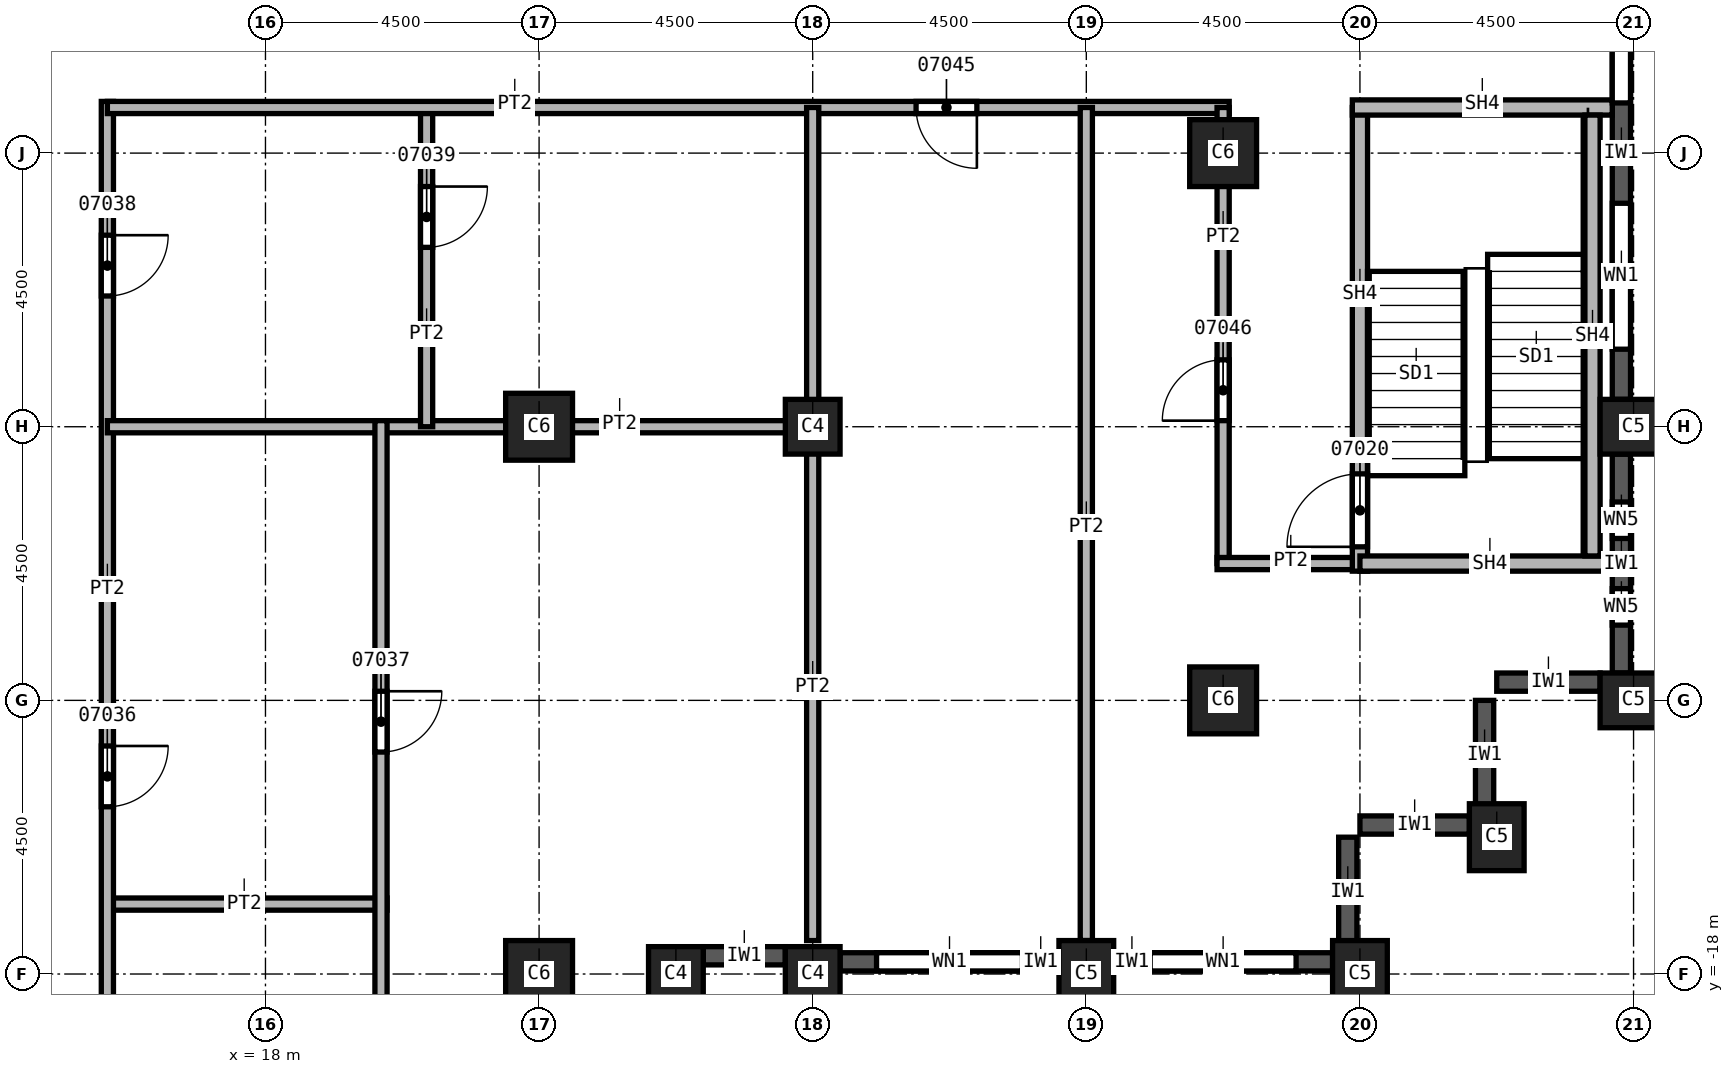
"""IFC4 building model, lengths in metres.
Left out: names, types, materials, properties, quantities, classifications, styles, units other than length and angle.
Written with IfcOpenShell. Run it as: python <this file> out.ifc"""

import sys

from ifc_helpers import new_model, si_unit, direction, frame, frame_2d, origin, origin_2d, place, context, subcontext, project, spatial, rectangle, extrude, element, fill, save


model = new_model("IFC4")
c1 = context("Model", 3, precision=1e-05, world=origin(), true_north=direction((0.0, 1.0)))
c2 = subcontext(c1, "Body", "Model", "MODEL_VIEW")
j1 = project(units=[si_unit("LENGTHUNIT", "METRE"), si_unit("PLANEANGLEUNIT", "RADIAN")], contexts=[c1])
p1 = place(None, origin())
s1 = spatial("IfcSite", under=j1, at=p1, CompositionType="ELEMENT")
p2 = place(p1, origin())
s2 = spatial("IfcBuilding", under=s1, at=p2, CompositionType="ELEMENT")
p3 = place(p2, frame((0.0, 0.0, 138.0)))
s3 = spatial("IfcBuildingStorey", under=s2, at=p3, CompositionType="ELEMENT", Elevation=138.0)
for number, where, z_axis, x_axis in (
    (1, (40.5, -9.0, 0.0), (0.0, 0.0, 1.0), (0.0, 1.0, 0.0)),
    (2, (40.5, -13.5, 0.0), (0.0, 0.0, 1.0), (0.0, 1.0, 0.0)),
    (3, (38.25, -15.75, 0.0), (0.0, 0.0, 1.0), (1.0, 0.0, 0.0)),
    (4, (31.5, -18.0, 0.0), (0.0, 0.0, 1.0), (1.0, 0.0, 0.0)),
    (5, (36.0, -18.0, 0.0), (0.0, 0.0, 1.0), (1.0, 0.0, 0.0)),
):
    element("IfcColumn", number, at=place(p3, frame(where, z_axis=z_axis, x_axis=x_axis)), inside=s3, PredefinedType="COLUMN", context=c2, shape_type="SweptSolid", body=[
        extrude(rectangle(XDim=0.9, YDim=1.1, at=origin_2d()), origin(), (0.0, 0.0, 1.0), 3.7),
    ])
for number, where, z_axis, x_axis in (
    (6, (33.75, -4.5, 0.0), (0.0, 0.0, 1.0), (1.0, 0.0, 0.0)),
    (7, (33.75, -13.5, 0.0), (0.0, 0.0, 1.0), (1.0, 0.0, 0.0)),
    (8, (22.5, -9.0, 0.0), (0.0, 0.0, 1.0), (1.0, 0.0, 0.0)),
    (9, (22.5, -18.0, 0.0), (0.0, 0.0, 1.0), (1.0, 0.0, 0.0)),
):
    element("IfcColumn", number, at=place(p3, frame(where, z_axis=z_axis, x_axis=x_axis)), inside=s3, PredefinedType="COLUMN", context=c2, shape_type="SweptSolid", body=[
        extrude(rectangle(XDim=1.1, YDim=1.1, at=origin_2d()), origin(), (0.0, 0.0, 1.0), 3.7),
    ])
for number, where, z_axis, x_axis in (
    (10, (27.0, -9.0, 0.0), (0.0, 0.0, 1.0), (1.0, 0.0, 0.0)),
    (11, (27.0, -18.0, 0.0), (0.0, 0.0, 1.0), (1.0, 0.0, 0.0)),
    (12, (24.75, -18.0, 0.0), (0.0, 0.0, 1.0), (1.0, 0.0, 0.0)),
):
    element("IfcColumn", number, at=place(p3, frame(where, z_axis=z_axis, x_axis=x_axis)), inside=s3, PredefinedType="COLUMN", context=c2, shape_type="SweptSolid", body=[
        extrude(rectangle(XDim=0.9, YDim=0.9, at=origin_2d()), origin(), (0.0, 0.0, 1.0), 3.7),
    ])
for number, where, z_axis, x_axis in (
    (13, (35.8, -17.55, 0.0), (0.0, 0.0, 1.0), (0.0, 1.0, 0.0)),
    (14, (37.8, -15.55, 0.0), (0.0, 0.0, 1.0), (-1.0, 0.0, 0.0)),
    (15, (38.05, -15.3, 0.0), (0.0, 0.0, 1.0), (0.0, 1.0, 0.0)),
):
    element("IfcWall", number, at=place(p3, frame(where, z_axis=z_axis, x_axis=x_axis)), inside=s3, PredefinedType="SOLIDWALL", context=c2, shape_type="SweptSolid", body=[
        extrude(rectangle(XDim=1.8, YDim=0.3, at=frame_2d((0.9, 0.0))), origin(), (0.0, 0.0, 1.0), 3.1),
    ])
p4 = place(p3, frame((39.95, -13.2, 0.0), z_axis=(0.0, 0.0, 1.0), x_axis=(-1.0, 0.0, 0.0)))
e16 = element("IfcWall", 16, at=p4, inside=s3, PredefinedType="SOLIDWALL", context=c2, shape_type="SweptSolid", body=[
    extrude(rectangle(XDim=1.7, YDim=0.3, at=frame_2d((0.85, 0.0))), origin(), (0.0, 0.0, 1.0), 3.1),
])
p5 = place(p3, frame((25.2, -17.7, 0.0), z_axis=(0.0, 0.0, 1.0), x_axis=(1.0, 0.0, 0.0)))
e17 = element("IfcWall", 17, at=p5, inside=s3, PredefinedType="SOLIDWALL", context=c2, shape_type="SweptSolid", body=[
    extrude(rectangle(XDim=1.35, YDim=0.3, at=frame_2d((0.675, 0.0))), origin(), (0.0, 0.0, 1.0), 3.1),
])
p6 = place(p3, frame((27.45, -17.8, 0.0), z_axis=(0.0, 0.0, 1.0), x_axis=(1.0, 0.0, 0.0)))
e18 = element("IfcWall", 18, at=p6, inside=s3, PredefinedType="SOLIDWALL", context=c2, shape_type="SweptSolid", body=[
    extrude(rectangle(XDim=3.6, YDim=0.3, at=frame_2d((1.8, 0.0))), origin(), (0.0, 0.0, 1.0), 3.1),
])
p7 = place(p6, frame((0.6, 0.0, 0.8)))
e19 = element("IfcOpeningElement", 19, at=p7, cuts=e18, PredefinedType="OPENING", context=c2, shape_type="SweptSolid", body=[
    extrude(rectangle(XDim=2.4, YDim=1.95, at=frame_2d((1.2, 0.975))), frame((0.0, 0.15, 0.0), z_axis=(0.0, -1.0, 0.0), x_axis=(1.0, 0.0, 0.0)), (0.0, 0.0, 1.0), 0.3),
])
p8 = place(p3, frame((31.95, -17.8, 0.0), z_axis=(0.0, 0.0, 1.0), x_axis=(1.0, 0.0, 0.0)))
e20 = element("IfcWall", 20, at=p8, inside=s3, PredefinedType="SOLIDWALL", context=c2, shape_type="SweptSolid", body=[
    extrude(rectangle(XDim=3.6, YDim=0.3, at=frame_2d((1.8, 0.0))), origin(), (0.0, 0.0, 1.0), 3.1),
])
p9 = place(p8, frame((0.6, 0.0, 0.8)))
e21 = element("IfcOpeningElement", 21, at=p9, cuts=e20, PredefinedType="OPENING", context=c2, shape_type="SweptSolid", body=[
    extrude(rectangle(XDim=2.4, YDim=1.95, at=frame_2d((1.2, 0.975))), frame((0.0, 0.15, 0.0), z_axis=(0.0, -1.0, 0.0), x_axis=(1.0, 0.0, 0.0)), (0.0, 0.0, 1.0), 0.3),
])
p10 = place(p3, frame((40.3, -13.05, 0.0), z_axis=(0.0, 0.0, 1.0), x_axis=(0.0, 1.0, 0.0)))
e22 = element("IfcWall", 22, at=p10, inside=s3, PredefinedType="SOLIDWALL", context=c2, shape_type="SweptSolid", body=[
    extrude(rectangle(XDim=3.6, YDim=0.3, at=frame_2d((1.8, 0.0))), origin(), (0.0, 0.0, 1.0), 3.1),
])
p11 = place(p10, frame((0.788, 0.0, 0.8)))
e23 = element("IfcOpeningElement", 23, at=p11, cuts=e22, PredefinedType="OPENING", context=c2, shape_type="SweptSolid", body=[
    extrude(rectangle(XDim=0.6, YDim=1.95, at=frame_2d((0.3, 0.975))), frame((0.0, 0.15, 0.0), z_axis=(0.0, -1.0, 0.0), x_axis=(1.0, 0.0, 0.0)), (0.0, 0.0, 1.0), 0.3),
])
p12 = place(p10, frame((2.212, 0.0, 0.8)))
e24 = element("IfcOpeningElement", 24, at=p12, cuts=e22, PredefinedType="OPENING", context=c2, shape_type="SweptSolid", body=[
    extrude(rectangle(XDim=0.6, YDim=1.95, at=frame_2d((0.3, 0.975))), frame((0.0, 0.15, 0.0), z_axis=(0.0, -1.0, 0.0), x_axis=(1.0, 0.0, 0.0)), (0.0, 0.0, 1.0), 0.3),
])
p13 = place(p3, frame((40.3, -8.55, 0.0), z_axis=(0.0, 0.0, 1.0), x_axis=(0.0, 1.0, 0.0)))
e25 = element("IfcWall", 25, at=p13, inside=s3, PredefinedType="SOLIDWALL", context=c2, shape_type="SweptSolid", body=[
    extrude(rectangle(XDim=8.1, YDim=0.3, at=frame_2d((4.05, 0.0))), origin(), (0.0, 0.0, 1.0), 3.1),
])
p14 = place(p13, frame((0.825, 0.0, 0.8)))
e26 = element("IfcOpeningElement", 26, at=p14, cuts=e25, PredefinedType="OPENING", context=c2, shape_type="SweptSolid", body=[
    extrude(rectangle(XDim=2.4, YDim=1.95, at=frame_2d((1.2, 0.975))), frame((0.0, 0.15, 0.0), z_axis=(0.0, -1.0, 0.0), x_axis=(1.0, 0.0, 0.0)), (0.0, 0.0, 1.0), 0.3),
])
p15 = place(p13, frame((4.875, 0.0, 0.8)))
e27 = element("IfcOpeningElement", 27, at=p15, cuts=e25, PredefinedType="OPENING", context=c2, shape_type="SweptSolid", body=[
    extrude(rectangle(XDim=2.4, YDim=1.95, at=frame_2d((1.2, 0.975))), frame((0.0, 0.15, 0.0), z_axis=(0.0, -1.0, 0.0), x_axis=(1.0, 0.0, 0.0)), (0.0, 0.0, 1.0), 0.3),
])
p16 = place(p3, frame((15.4, -16.85, 0.0), z_axis=(0.0, 0.0, 1.0), x_axis=(1.0, 0.0, 0.0)))
e28 = element("IfcWall", 28, at=p16, inside=s3, PredefinedType="PARTITIONING", context=c2, shape_type="SweptSolid", body=[
    extrude(rectangle(XDim=4.6, YDim=0.2, at=frame_2d((2.3, 0.0))), origin(), (0.0, 0.0, 1.0), 3.7),
])
p17 = place(p3, frame((15.4, -3.65, 0.0), z_axis=(0.0, 0.0, 1.0), x_axis=(0.0, -1.0, 0.0)))
e29 = element("IfcWall", 29, at=p17, inside=s3, PredefinedType="PARTITIONING", context=c2, shape_type="SweptSolid", body=[
    extrude(rectangle(XDim=19.6, YDim=0.2, at=frame_2d((9.8, 0.0))), origin(), (0.0, 0.0, 1.0), 3.7),
])
p18 = place(p17, frame((18.3, 0.0, 0.0)))
e30 = element("IfcOpeningElement", 30, at=p18, cuts=e29, PredefinedType="OPENING", context=c2, shape_type="SweptSolid", body=[
    extrude(rectangle(XDim=1.0, YDim=2.1, at=frame_2d((0.5, 1.05))), frame((0.0, 0.1, 0.0), z_axis=(0.0, -1.0, 0.0), x_axis=(1.0, 0.0, 0.0)), (0.0, 0.0, 1.0), 0.2),
])
p19 = place(p17, frame((10.6, 0.0, 0.0)))
e31 = element("IfcOpeningElement", 31, at=p19, cuts=e29, PredefinedType="OPENING", context=c2, shape_type="SweptSolid", body=[
    extrude(rectangle(XDim=1.0, YDim=2.1, at=frame_2d((0.5, 1.05))), frame((0.0, 0.1, 0.0), z_axis=(0.0, -1.0, 0.0), x_axis=(1.0, 0.0, 0.0)), (0.0, 0.0, 1.0), 0.2),
])
p20 = place(p17, frame((2.2, 0.0, 0.0)))
e32 = element("IfcOpeningElement", 32, at=p20, cuts=e29, PredefinedType="OPENING", context=c2, shape_type="SweptSolid", body=[
    extrude(rectangle(XDim=1.0, YDim=2.1, at=frame_2d((0.5, 1.05))), frame((0.0, 0.1, 0.0), z_axis=(0.0, -1.0, 0.0), x_axis=(1.0, 0.0, 0.0)), (0.0, 0.0, 1.0), 0.2),
])
p21 = place(p3, frame((15.4, -9.0, 0.0), z_axis=(0.0, 0.0, 1.0), x_axis=(1.0, 0.0, 0.0)))
e33 = element("IfcWall", 33, at=p21, inside=s3, PredefinedType="PARTITIONING", context=c2, shape_type="SweptSolid", body=[
    extrude(rectangle(XDim=11.7, YDim=0.2, at=frame_2d((5.85, 0.0))), origin(), (0.0, 0.0, 1.0), 3.7),
])
p22 = place(p3, frame((19.9, -8.9, 0.0), z_axis=(0.0, 0.0, 1.0), x_axis=(0.0, -1.0, 0.0)))
e34 = element("IfcWall", 34, at=p22, inside=s3, PredefinedType="PARTITIONING", context=c2, shape_type="SweptSolid", body=[
    extrude(rectangle(XDim=14.35, YDim=0.2, at=frame_2d((7.175, 0.0))), origin(), (0.0, 0.0, 1.0), 3.7),
])
p23 = place(p22, frame((4.45, 0.0, 0.0)))
e35 = element("IfcOpeningElement", 35, at=p23, cuts=e34, PredefinedType="OPENING", context=c2, shape_type="SweptSolid", body=[
    extrude(rectangle(XDim=1.0, YDim=2.1, at=frame_2d((0.5, 1.05))), frame((0.0, 0.1, 0.0), z_axis=(0.0, -1.0, 0.0), x_axis=(1.0, 0.0, 0.0)), (0.0, 0.0, 1.0), 0.2),
])
p24 = place(p3, frame((20.65, -3.75, 0.0), z_axis=(0.0, 0.0, 1.0), x_axis=(0.0, -1.0, 0.0)))
e36 = element("IfcWall", 36, at=p24, inside=s3, PredefinedType="PARTITIONING", context=c2, shape_type="SweptSolid", body=[
    extrude(rectangle(XDim=5.25, YDim=0.2, at=frame_2d((2.625, 0.0))), origin(), (0.0, 0.0, 1.0), 3.7),
])
p25 = place(p24, frame((1.3, 0.0, 0.0)))
e37 = element("IfcOpeningElement", 37, at=p25, cuts=e36, PredefinedType="OPENING", context=c2, shape_type="SweptSolid", body=[
    extrude(rectangle(XDim=1.0, YDim=2.1, at=frame_2d((0.5, 1.05))), frame((0.0, 0.1, 0.0), z_axis=(0.0, -1.0, 0.0), x_axis=(1.0, 0.0, 0.0)), (0.0, 0.0, 1.0), 0.2),
])
p26 = place(p3, frame((33.85, -3.75, 0.0), z_axis=(0.0, 0.0, 1.0), x_axis=(-1.0, 0.0, 0.0)))
e38 = element("IfcWall", 38, at=p26, inside=s3, PredefinedType="PARTITIONING", context=c2, shape_type="SweptSolid", body=[
    extrude(rectangle(XDim=18.45, YDim=0.2, at=frame_2d((9.225, 0.0))), origin(), (0.0, 0.0, 1.0), 3.7),
])
p27 = place(p26, frame((4.15, 0.0, 0.0)))
e39 = element("IfcOpeningElement", 39, at=p27, cuts=e38, PredefinedType="OPENING", context=c2, shape_type="SweptSolid", body=[
    extrude(rectangle(XDim=1.0, YDim=2.1, at=frame_2d((0.5, 1.05))), frame((0.0, 0.1, 0.0), z_axis=(0.0, -1.0, 0.0), x_axis=(1.0, 0.0, 0.0)), (0.0, 0.0, 1.0), 0.2),
])
for number, where, z_axis, x_axis in (
    (40, (27.0, -3.75, 0.0), (0.0, 0.0, 1.0), (0.0, -1.0, 0.0)),
    (41, (31.5, -3.75, 0.0), (0.0, 0.0, 1.0), (0.0, -1.0, 0.0)),
):
    element("IfcWall", number, at=place(p3, frame(where, z_axis=z_axis, x_axis=x_axis)), inside=s3, PredefinedType="PARTITIONING", context=c2, shape_type="SweptSolid", body=[
        extrude(rectangle(XDim=13.7, YDim=0.2, at=frame_2d((6.85, 0.0))), origin(), (0.0, 0.0, 1.0), 3.7),
    ])
p28 = place(p3, frame((33.75, -11.25, 0.0), z_axis=(0.0, 0.0, 1.0), x_axis=(0.0, 1.0, 0.0)))
e42 = element("IfcWall", 42, at=p28, inside=s3, PredefinedType="PARTITIONING", context=c2, shape_type="SweptSolid", body=[
    extrude(rectangle(XDim=7.5, YDim=0.2, at=frame_2d((3.75, 0.0))), origin(), (0.0, 0.0, 1.0), 3.7),
])
p29 = place(p28, frame((2.35, 0.0, 0.0)))
e43 = element("IfcOpeningElement", 43, at=p29, cuts=e42, PredefinedType="OPENING", context=c2, shape_type="SweptSolid", body=[
    extrude(rectangle(XDim=1.0, YDim=2.1, at=frame_2d((0.5, 1.05))), frame((0.0, 0.1, 0.0), z_axis=(0.0, -1.0, 0.0), x_axis=(1.0, 0.0, 0.0)), (0.0, 0.0, 1.0), 0.2),
])
p30 = place(p3, frame((36.0, -11.25, 0.0), z_axis=(0.0, 0.0, 1.0), x_axis=(-1.0, 0.0, 0.0)))
e44 = element("IfcWall", 44, at=p30, inside=s3, PredefinedType="PARTITIONING", context=c2, shape_type="SweptSolid", body=[
    extrude(rectangle(XDim=2.35, YDim=0.2, at=frame_2d((1.175, 0.0))), origin(), (0.0, 0.0, 1.0), 3.7),
])
p31 = place(p3, frame((36.0, -11.375, 0.0), z_axis=(0.0, 0.0, 1.0), x_axis=(0.0, 1.0, 0.0)))
e45 = element("IfcWall", 45, at=p31, inside=s3, PredefinedType="SOLIDWALL", context=c2, shape_type="SweptSolid", body=[
    extrude(rectangle(XDim=7.625, YDim=0.25, at=frame_2d((3.812, 0.0))), origin(), (0.0, 0.0, 1.0), 3.7),
])
p32 = place(p31, frame((0.4, 0.0, 0.0)))
e46 = element("IfcOpeningElement", 46, at=p32, cuts=e45, PredefinedType="OPENING", context=c2, shape_type="SweptSolid", body=[
    extrude(rectangle(XDim=1.2, YDim=2.1, at=frame_2d((0.6, 1.05))), frame((0.0, 0.125, 0.0), z_axis=(0.0, -1.0, 0.0), x_axis=(1.0, 0.0, 0.0)), (0.0, 0.0, 1.0), 0.25),
])
p33 = place(p3, frame((40.15, -11.25, 0.0), z_axis=(0.0, 0.0, 1.0), x_axis=(-1.0, 0.0, 0.0)))
e47 = element("IfcWall", 47, at=p33, inside=s3, PredefinedType="SOLIDWALL", context=c2, shape_type="SweptSolid", body=[
    extrude(rectangle(XDim=4.15, YDim=0.25, at=frame_2d((2.075, 0.0))), origin(), (0.0, 0.0, 1.0), 3.7),
])
p34 = place(p3, frame((40.15, -3.75, 0.0), z_axis=(0.0, 0.0, 1.0), x_axis=(-1.0, 0.0, 0.0)))
e48 = element("IfcWall", 48, at=p34, inside=s3, PredefinedType="SOLIDWALL", context=c2, shape_type="SweptSolid", body=[
    extrude(rectangle(XDim=4.275, YDim=0.25, at=frame_2d((2.137, 0.0))), origin(), (0.0, 0.0, 1.0), 3.7),
])
p35 = place(p3, frame((39.825, -11.125, 0.0), z_axis=(0.0, 0.0, 1.0), x_axis=(0.0, 1.0, 0.0)))
e49 = element("IfcWall", 49, at=p35, inside=s3, PredefinedType="SOLIDWALL", context=c2, shape_type="SweptSolid", body=[
    extrude(rectangle(XDim=7.25, YDim=0.25, at=frame_2d((3.625, 0.0))), origin(), (0.0, 0.0, 1.0), 3.7),
])
p36 = place(p7, origin())
e50 = element("IfcWindow", 50, at=p36, inside=s3, PartitioningType="SINGLE_PANEL", PredefinedType="WINDOW", context=c2, shape_type="SweptSolid", body=[
    extrude(rectangle(XDim=2.4, YDim=1.95, at=frame_2d((1.2, 0.975))), frame((0.0, 0.03, 0.0), z_axis=(0.0, -1.0, 0.0), x_axis=(1.0, 0.0, 0.0)), (0.0, 0.0, 1.0), 0.06),
])
fill(e19, e50)
p37 = place(p9, origin())
e51 = element("IfcWindow", 51, at=p37, inside=s3, PartitioningType="SINGLE_PANEL", PredefinedType="WINDOW", context=c2, shape_type="SweptSolid", body=[
    extrude(rectangle(XDim=2.4, YDim=1.95, at=frame_2d((1.2, 0.975))), frame((0.0, 0.03, 0.0), z_axis=(0.0, -1.0, 0.0), x_axis=(1.0, 0.0, 0.0)), (0.0, 0.0, 1.0), 0.06),
])
fill(e21, e51)
p38 = place(p14, origin())
e52 = element("IfcWindow", 52, at=p38, inside=s3, PartitioningType="SINGLE_PANEL", PredefinedType="WINDOW", context=c2, shape_type="SweptSolid", body=[
    extrude(rectangle(XDim=2.4, YDim=1.95, at=frame_2d((1.2, 0.975))), frame((0.0, 0.03, 0.0), z_axis=(0.0, -1.0, 0.0), x_axis=(1.0, 0.0, 0.0)), (0.0, 0.0, 1.0), 0.06),
])
fill(e26, e52)
p39 = place(p15, origin())
e53 = element("IfcWindow", 53, at=p39, inside=s3, PartitioningType="SINGLE_PANEL", PredefinedType="WINDOW", context=c2, shape_type="SweptSolid", body=[
    extrude(rectangle(XDim=2.4, YDim=1.95, at=frame_2d((1.2, 0.975))), frame((0.0, 0.03, 0.0), z_axis=(0.0, -1.0, 0.0), x_axis=(1.0, 0.0, 0.0)), (0.0, 0.0, 1.0), 0.06),
])
fill(e27, e53)
p40 = place(p32, origin())
e54 = element("IfcDoor", 54, at=p40, inside=s3, OperationType="SINGLE_SWING_LEFT", PredefinedType="DOOR", context=c2, shape_type="SweptSolid", body=[
    extrude(rectangle(XDim=1.2, YDim=2.1, at=frame_2d((0.6, 1.05))), frame((0.0, 0.025, 0.0), z_axis=(0.0, -1.0, 0.0), x_axis=(1.0, 0.0, 0.0)), (0.0, 0.0, 1.0), 0.05),
])
fill(e46, e54)
p41 = place(p19, origin())
e55 = element("IfcDoor", 55, at=p41, inside=s3, OperationType="SINGLE_SWING_LEFT", PredefinedType="DOOR", context=c2, shape_type="SweptSolid", body=[
    extrude(rectangle(XDim=1.0, YDim=2.1, at=frame_2d((0.5, 1.05))), frame((0.0, 0.025, 0.0), z_axis=(0.0, -1.0, 0.0), x_axis=(1.0, 0.0, 0.0)), (0.0, 0.0, 1.0), 0.05),
])
fill(e31, e55)
p42 = place(p23, origin())
e56 = element("IfcDoor", 56, at=p42, inside=s3, OperationType="SINGLE_SWING_RIGHT", PredefinedType="DOOR", context=c2, shape_type="SweptSolid", body=[
    extrude(rectangle(XDim=1.0, YDim=2.1, at=frame_2d((0.5, 1.05))), frame((0.0, 0.025, 0.0), z_axis=(0.0, -1.0, 0.0), x_axis=(1.0, 0.0, 0.0)), (0.0, 0.0, 1.0), 0.05),
])
fill(e35, e56)
p43 = place(p20, origin())
e57 = element("IfcDoor", 57, at=p43, inside=s3, OperationType="SINGLE_SWING_LEFT", PredefinedType="DOOR", context=c2, shape_type="SweptSolid", body=[
    extrude(rectangle(XDim=1.0, YDim=2.1, at=frame_2d((0.5, 1.05))), frame((0.0, 0.025, 0.0), z_axis=(0.0, -1.0, 0.0), x_axis=(1.0, 0.0, 0.0)), (0.0, 0.0, 1.0), 0.05),
])
fill(e32, e57)
p44 = place(p25, origin())
e58 = element("IfcDoor", 58, at=p44, inside=s3, OperationType="SINGLE_SWING_RIGHT", PredefinedType="DOOR", context=c2, shape_type="SweptSolid", body=[
    extrude(rectangle(XDim=1.0, YDim=2.1, at=frame_2d((0.5, 1.05))), frame((0.0, 0.025, 0.0), z_axis=(0.0, -1.0, 0.0), x_axis=(1.0, 0.0, 0.0)), (0.0, 0.0, 1.0), 0.05),
])
fill(e37, e58)
p45 = place(p27, origin())
e59 = element("IfcDoor", 59, at=p45, inside=s3, OperationType="SINGLE_SWING_RIGHT", PredefinedType="DOOR", context=c2, shape_type="SweptSolid", body=[
    extrude(rectangle(XDim=1.0, YDim=2.1, at=frame_2d((0.5, 1.05))), frame((0.0, 0.025, 0.0), z_axis=(0.0, -1.0, 0.0), x_axis=(1.0, 0.0, 0.0)), (0.0, 0.0, 1.0), 0.05),
])
fill(e39, e59)
p46 = place(p29, origin())
e60 = element("IfcDoor", 60, at=p46, inside=s3, OperationType="SINGLE_SWING_LEFT", PredefinedType="DOOR", context=c2, shape_type="SweptSolid", body=[
    extrude(rectangle(XDim=1.0, YDim=2.1, at=frame_2d((0.5, 1.05))), frame((0.0, 0.025, 0.0), z_axis=(0.0, -1.0, 0.0), x_axis=(1.0, 0.0, 0.0)), (0.0, 0.0, 1.0), 0.05),
])
fill(e43, e60)
p47 = place(p11, origin())
e61 = element("IfcWindow", 61, at=p47, inside=s3, PartitioningType="SINGLE_PANEL", PredefinedType="WINDOW", context=c2, shape_type="SweptSolid", body=[
    extrude(rectangle(XDim=0.6, YDim=1.95, at=frame_2d((0.3, 0.975))), frame((0.0, 0.03, 0.0), z_axis=(0.0, -1.0, 0.0), x_axis=(1.0, 0.0, 0.0)), (0.0, 0.0, 1.0), 0.06),
])
fill(e23, e61)
p48 = place(p12, origin())
e62 = element("IfcWindow", 62, at=p48, inside=s3, PartitioningType="SINGLE_PANEL", PredefinedType="WINDOW", context=c2, shape_type="SweptSolid", body=[
    extrude(rectangle(XDim=0.6, YDim=1.95, at=frame_2d((0.3, 0.975))), frame((0.0, 0.03, 0.0), z_axis=(0.0, -1.0, 0.0), x_axis=(1.0, 0.0, 0.0)), (0.0, 0.0, 1.0), 0.06),
])
fill(e24, e62)
save(model, sys.argv[1])
